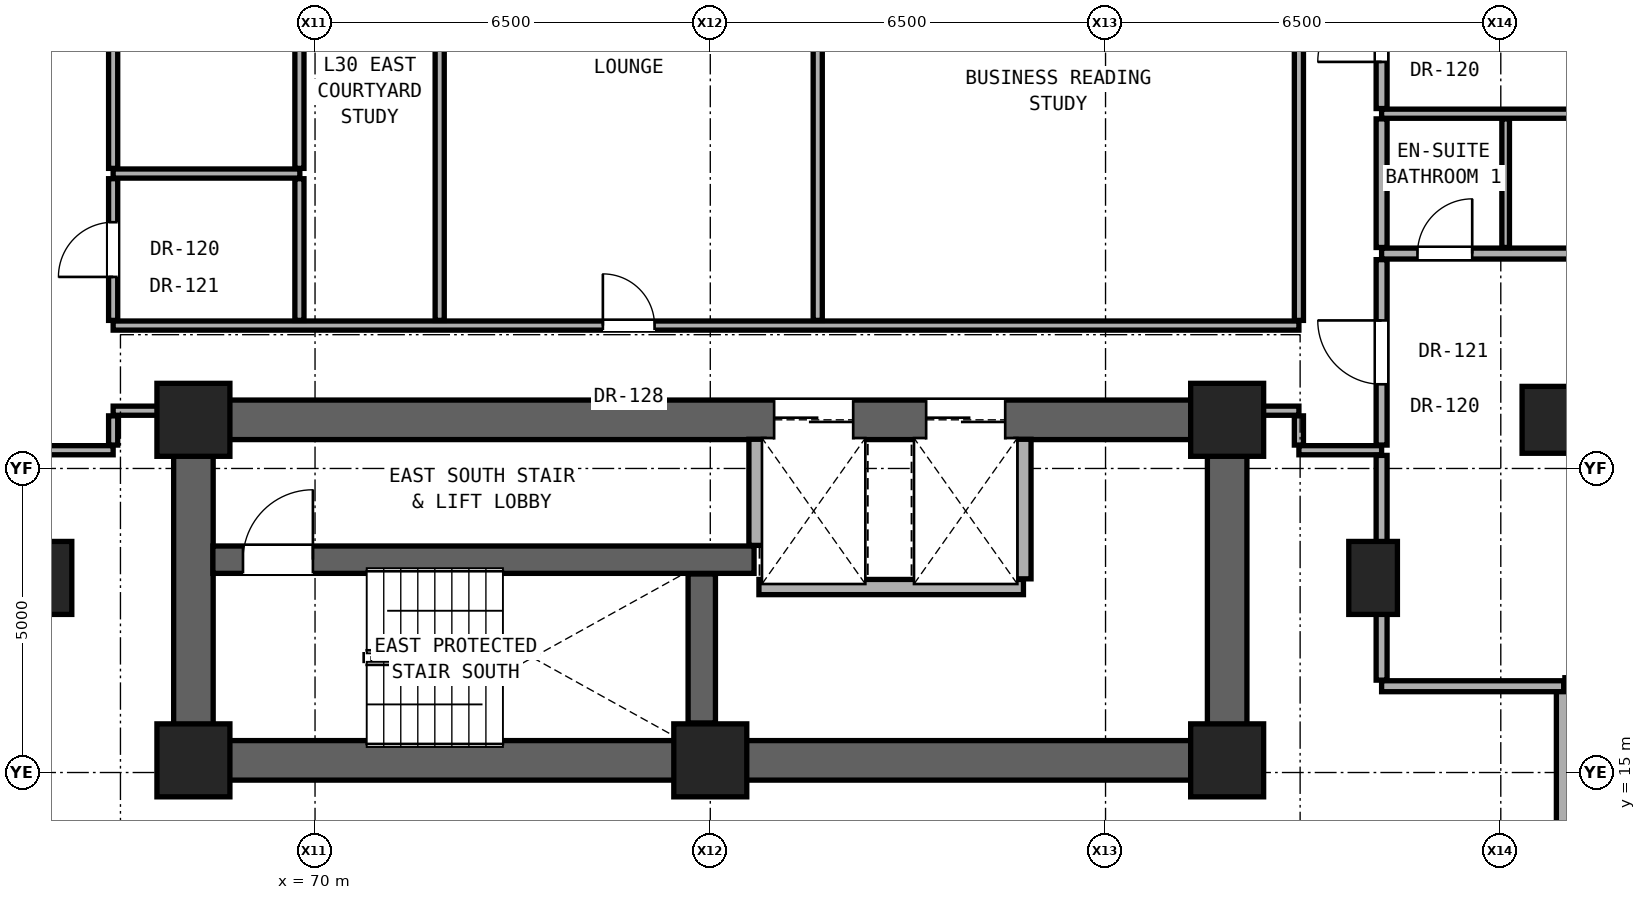
"""IFC4 building model, lengths in metres.
Left out: names, types, materials, properties, quantities, classifications, styles, units other than length and angle.
Written with IfcOpenShell. Run it as: python <this file> out.ifc"""

import sys

from ifc_helpers import new_model, si_unit, direction, frame, frame_2d, origin, origin_2d, place, context, subcontext, project, spatial, rectangle, hollow_rectangle, extrude, element, fill, save


model = new_model("IFC4")
c1 = context("Model", 3, precision=1e-05, world=origin(), true_north=direction((0.0, 1.0)))
c2 = subcontext(c1, "Body", "Model", "MODEL_VIEW")
j1 = project(units=[si_unit("LENGTHUNIT", "METRE"), si_unit("PLANEANGLEUNIT", "RADIAN")], contexts=[c1])
p1 = place(None, origin())
s1 = spatial("IfcSite", under=j1, at=p1, CompositionType="ELEMENT")
p2 = place(p1, origin())
s2 = spatial("IfcBuilding", under=s1, at=p2, CompositionType="ELEMENT")
p3 = place(p2, frame((0.0, 0.0, 108.2)))
s3 = spatial("IfcBuildingStorey", under=s2, at=p3, CompositionType="ELEMENT", Elevation=108.2)
for number, where, z_axis, x_axis in (
    (1, (68.0, 15.2, 0.0), (0.0, 0.0, 1.0), (1.0, 0.0, 0.0)),
    (2, (76.5, 15.2, 0.0), (0.0, 0.0, 1.0), (1.0, 0.0, 0.0)),
    (3, (85.0, 15.2, 0.0), (0.0, 0.0, 1.0), (1.0, 0.0, 0.0)),
    (4, (68.0, 20.8, 0.0), (0.0, 0.0, 1.0), (1.0, 0.0, 0.0)),
    (5, (85.0, 20.8, 0.0), (0.0, 0.0, 1.0), (1.0, 0.0, 0.0)),
):
    element("IfcColumn", number, at=place(p3, frame(where, z_axis=z_axis, x_axis=x_axis)), inside=s3, PredefinedType="COLUMN", context=c2, shape_type="SweptSolid", body=[
        extrude(rectangle(XDim=1.2, YDim=1.2, at=origin_2d()), origin(), (0.0, 0.0, 1.0), 3.3),
    ])
p4 = place(p3, frame((90.4, 20.8, 0.0), z_axis=(0.0, 0.0, 1.0), x_axis=(1.0, 0.0, 0.0)))
e6 = element("IfcColumn", 6, at=p4, inside=s3, PredefinedType="COLUMN", context=c2, shape_type="SweptSolid", body=[
    extrude(hollow_rectangle(XDim=1.1, YDim=1.1, WallThickness=0.06, at=origin_2d()), origin(), (0.0, 0.0, 1.0), 3.3),
])
for number, where, z_axis, x_axis in (
    (7, (65.6, 18.2, 0.0), (0.0, 0.0, 1.0), (1.0, 0.0, 0.0)),
    (8, (87.4, 18.2, 0.0), (0.0, 0.0, 1.0), (1.0, 0.0, 0.0)),
):
    element("IfcColumn", number, at=place(p3, frame(where, z_axis=z_axis, x_axis=x_axis)), inside=s3, PredefinedType="PILASTER", context=c2, shape_type="SweptSolid", body=[
        extrude(rectangle(XDim=0.8, YDim=1.2, at=origin_2d()), origin(), (0.0, 0.0, 1.0), 3.3),
    ])
p5 = place(p3, frame((68.0, 15.2, 0.0), z_axis=(0.0, 0.0, 1.0), x_axis=(1.0, 0.0, 0.0)))
e9 = element("IfcWall", 9, at=p5, inside=s3, PredefinedType="SHEAR", context=c2, shape_type="SweptSolid", body=[
    extrude(rectangle(XDim=17.0, YDim=0.65, at=frame_2d((8.5, 0.0))), origin(), (0.0, 0.0, 1.0), 3.08),
])
for number, where, z_axis, x_axis in (
    (10, (68.0, 15.2, 0.0), (0.0, 0.0, 1.0), (0.0, 1.0, 0.0)),
    (11, (85.0, 15.2, 0.0), (0.0, 0.0, 1.0), (0.0, 1.0, 0.0)),
):
    element("IfcWall", number, at=place(p3, frame(where, z_axis=z_axis, x_axis=x_axis)), inside=s3, PredefinedType="SHEAR", context=c2, shape_type="SweptSolid", body=[
        extrude(rectangle(XDim=5.6, YDim=0.65, at=frame_2d((2.8, 0.0))), origin(), (0.0, 0.0, 1.0), 3.08),
    ])
p6 = place(p3, frame((68.0, 20.8, 0.0), z_axis=(0.0, 0.0, 1.0), x_axis=(1.0, 0.0, 0.0)))
e12 = element("IfcWall", 12, at=p6, inside=s3, PredefinedType="SHEAR", context=c2, shape_type="SweptSolid", body=[
    extrude(rectangle(XDim=17.0, YDim=0.65, at=frame_2d((8.5, 0.0))), origin(), (0.0, 0.0, 1.0), 3.08),
])
p7 = place(p6, frame((9.55, 0.0, 0.0)))
e13 = element("IfcOpeningElement", 13, at=p7, cuts=e12, PredefinedType="OPENING", context=c2, shape_type="SweptSolid", body=[
    extrude(rectangle(XDim=1.3, YDim=2.3, at=frame_2d((0.65, 1.15))), frame((0.0, 0.335, 0.0), z_axis=(0.0, -1.0, 0.0), x_axis=(1.0, 0.0, 0.0)), (0.0, 0.0, 1.0), 0.67),
])
p8 = place(p6, frame((12.05, 0.0, 0.0)))
e14 = element("IfcOpeningElement", 14, at=p8, cuts=e12, PredefinedType="OPENING", context=c2, shape_type="SweptSolid", body=[
    extrude(rectangle(XDim=1.3, YDim=2.3, at=frame_2d((0.65, 1.15))), frame((0.0, 0.335, 0.0), z_axis=(0.0, -1.0, 0.0), x_axis=(1.0, 0.0, 0.0)), (0.0, 0.0, 1.0), 0.67),
])
p9 = place(p3, frame((90.554, 16.419, 0.0), z_axis=(0.0, 0.0, 1.0), x_axis=(1.0, 0.0, 0.0)))
e15 = element("IfcWall", 15, at=p9, inside=s3, PredefinedType="SOLIDWALL", context=c2, shape_type="SweptSolid", body=[
    extrude(rectangle(XDim=4.516, YDim=0.28, at=frame_2d((2.258, 0.0))), origin(), (0.0, 0.0, 1.0), 3.06),
])
p10 = place(p9, frame((0.65, 0.0, 0.85)))
e16 = element("IfcOpeningElement", 16, at=p10, cuts=e15, PredefinedType="OPENING", context=c2, shape_type="SweptSolid", body=[
    extrude(rectangle(XDim=1.1, YDim=2.0, at=frame_2d((0.55, 1.0))), frame((0.0, 0.15, 0.0), z_axis=(0.0, -1.0, 0.0), x_axis=(1.0, 0.0, 0.0)), (0.0, 0.0, 1.0), 0.3),
])
p11 = place(p3, frame((90.554, 11.903, 0.0), z_axis=(0.0, 0.0, 1.0), x_axis=(0.0, 1.0, 0.0)))
e17 = element("IfcWall", 17, at=p11, inside=s3, PredefinedType="SOLIDWALL", context=c2, shape_type="SweptSolid", body=[
    extrude(rectangle(XDim=4.516, YDim=0.28, at=frame_2d((2.258, 0.0))), origin(), (0.0, 0.0, 1.0), 3.06),
])
p12 = place(p3, frame((87.54, 16.419, 0.0), z_axis=(0.0, 0.0, 1.0), x_axis=(1.0, 0.0, 0.0)))
e18 = element("IfcWall", 18, at=p12, inside=s3, PredefinedType="PARTITIONING", context=c2, shape_type="SweptSolid", body=[
    extrude(rectangle(XDim=2.994, YDim=0.18, at=frame_2d((1.497, 0.0))), origin(), (0.0, 0.0, 1.0), 3.08),
])
p13 = place(p3, frame((77.3, 18.05, 0.0), z_axis=(0.0, 0.0, 1.0), x_axis=(1.0, 0.0, 0.0)))
e19 = element("IfcWall", 19, at=p13, inside=s3, PredefinedType="SOLIDWALL", context=c2, shape_type="SweptSolid", body=[
    extrude(rectangle(XDim=4.35, YDim=0.25, at=frame_2d((2.175, 0.0))), origin(), (0.0, 0.0, 1.0), 3.08),
])
p14 = place(p3, frame((68.32, 18.5, 0.0), z_axis=(0.0, 0.0, 1.0), x_axis=(1.0, 0.0, 0.0)))
e20 = element("IfcWall", 20, at=p14, inside=s3, PredefinedType="SHEAR", context=c2, shape_type="SweptSolid", body=[
    extrude(rectangle(XDim=8.9, YDim=0.45, at=frame_2d((4.45, 0.0))), origin(), (0.0, 0.0, 1.0), 3.08),
])
p15 = place(p14, frame((0.495, 0.0, 0.0)))
e21 = element("IfcOpeningElement", 21, at=p15, cuts=e20, PredefinedType="OPENING", context=c2, shape_type="SweptSolid", body=[
    extrude(rectangle(XDim=1.15, YDim=2.2, at=frame_2d((0.575, 1.1))), frame((0.0, 0.235, 0.0), z_axis=(0.0, -1.0, 0.0), x_axis=(1.0, 0.0, 0.0)), (0.0, 0.0, 1.0), 0.47),
])
p16 = place(p3, frame((65.32, 20.3, 0.0), z_axis=(0.0, 0.0, 1.0), x_axis=(1.0, 0.0, 0.0)))
e22 = element("IfcWall", 22, at=p16, inside=s3, PredefinedType="PARTITIONING", context=c2, shape_type="SweptSolid", body=[
    extrude(rectangle(XDim=1.36, YDim=0.15, at=frame_2d((0.68, 0.0))), origin(), (0.0, 0.0, 1.0), 3.08),
])
p17 = place(p3, frame((86.18, 20.3, 0.0), z_axis=(0.0, 0.0, 1.0), x_axis=(1.0, 0.0, 0.0)))
e23 = element("IfcWall", 23, at=p17, inside=s3, PredefinedType="PARTITIONING", context=c2, shape_type="SweptSolid", body=[
    extrude(rectangle(XDim=1.36, YDim=0.15, at=frame_2d((0.68, 0.0))), origin(), (0.0, 0.0, 1.0), 3.08),
])
p18 = place(p3, frame((66.68, 20.95, 0.0), z_axis=(0.0, 0.0, 1.0), x_axis=(1.0, 0.0, 0.0)))
e24 = element("IfcWall", 24, at=p18, inside=s3, PredefinedType="PARTITIONING", context=c2, shape_type="SweptSolid", body=[
    extrude(rectangle(XDim=1.0, YDim=0.15, at=frame_2d((0.5, 0.0))), origin(), (0.0, 0.0, 1.0), 2.472),
])
p19 = place(p3, frame((85.32, 20.95, 0.0), z_axis=(0.0, 0.0, 1.0), x_axis=(1.0, 0.0, 0.0)))
e25 = element("IfcWall", 25, at=p19, inside=s3, PredefinedType="PARTITIONING", context=c2, shape_type="SweptSolid", body=[
    extrude(rectangle(XDim=0.86, YDim=0.15, at=frame_2d((0.43, 0.0))), origin(), (0.0, 0.0, 1.0), 2.472),
])
p20 = place(p3, frame((66.68, 22.35, 0.0), z_axis=(0.0, 0.0, 1.0), x_axis=(1.0, 0.0, 0.0)))
e26 = element("IfcWall", 26, at=p20, inside=s3, PredefinedType="PARTITIONING", context=c2, shape_type="SweptSolid", body=[
    extrude(rectangle(XDim=19.5, YDim=0.15, at=frame_2d((9.75, 0.0))), origin(), (0.0, 0.0, 1.0), 2.145),
])
p21 = place(p20, frame((8.053, 0.0, 0.0)))
e27 = element("IfcOpeningElement", 27, at=p21, cuts=e26, PredefinedType="OPENING", context=c2, shape_type="SweptSolid", body=[
    extrude(rectangle(XDim=0.85, YDim=2.01, at=frame_2d((0.425, 1.005))), frame((0.0, 0.085, 0.0), z_axis=(0.0, -1.0, 0.0), x_axis=(1.0, 0.0, 0.0)), (0.0, 0.0, 1.0), 0.17),
])
p22 = place(p3, frame((87.54, 23.534, 0.0), z_axis=(0.0, 0.0, 1.0), x_axis=(1.0, 0.0, 0.0)))
e28 = element("IfcWall", 28, at=p22, inside=s3, PredefinedType="PARTITIONING", context=c2, shape_type="SweptSolid", body=[
    extrude(rectangle(XDim=7.53, YDim=0.18, at=frame_2d((3.765, 0.0))), origin(), (0.0, 0.0, 1.0), 2.216),
])
p23 = place(p22, frame((4.29, 0.0, 0.0)))
e29 = element("IfcOpeningElement", 29, at=p23, cuts=e28, PredefinedType="OPENING", context=c2, shape_type="SweptSolid", body=[
    extrude(rectangle(XDim=0.95, YDim=2.15, at=frame_2d((0.475, 1.075))), frame((0.0, 0.1, 0.0), z_axis=(0.0, -1.0, 0.0), x_axis=(1.0, 0.0, 0.0)), (0.0, 0.0, 1.0), 0.2),
])
p24 = place(p22, frame((0.59, 0.0, 0.0)))
e30 = element("IfcOpeningElement", 30, at=p24, cuts=e28, PredefinedType="OPENING", context=c2, shape_type="SweptSolid", body=[
    extrude(rectangle(XDim=0.9, YDim=2.1, at=frame_2d((0.45, 1.05))), frame((0.0, 0.1, 0.0), z_axis=(0.0, -1.0, 0.0), x_axis=(1.0, 0.0, 0.0)), (0.0, 0.0, 1.0), 0.2),
])
p25 = place(p3, frame((66.68, 24.85, 0.0), z_axis=(0.0, 0.0, 1.0), x_axis=(1.0, 0.0, 0.0)))
e31 = element("IfcWall", 31, at=p25, inside=s3, PredefinedType="PARTITIONING", context=c2, shape_type="SweptSolid", body=[
    extrude(rectangle(XDim=3.07, YDim=0.15, at=frame_2d((1.535, 0.0))), origin(), (0.0, 0.0, 1.0), 2.145),
])
p26 = place(p3, frame((87.54, 25.834, 0.0), z_axis=(0.0, 0.0, 1.0), x_axis=(1.0, 0.0, 0.0)))
e32 = element("IfcWall", 32, at=p26, inside=s3, PredefinedType="PARTITIONING", context=c2, shape_type="SweptSolid", body=[
    extrude(rectangle(XDim=7.53, YDim=0.15, at=frame_2d((3.765, 0.0))), origin(), (0.0, 0.0, 1.0), 2.216),
])
p27 = place(p3, frame((66.68, 20.385, 0.0), z_axis=(0.0, 0.0, 1.0), x_axis=(0.0, 1.0, 0.0)))
e33 = element("IfcWall", 33, at=p27, inside=s3, PredefinedType="PARTITIONING", context=c2, shape_type="SweptSolid", body=[
    extrude(rectangle(XDim=0.48, YDim=0.15, at=frame_2d((0.24, 0.0))), origin(), (0.0, 0.0, 1.0), 2.472),
])
p28 = place(p3, frame((66.68, 22.435, 0.0), z_axis=(0.0, 0.0, 1.0), x_axis=(0.0, 1.0, 0.0)))
e34 = element("IfcWall", 34, at=p28, inside=s3, PredefinedType="PARTITIONING", context=c2, shape_type="SweptSolid", body=[
    extrude(rectangle(XDim=2.33, YDim=0.15, at=frame_2d((1.165, 0.0))), origin(), (0.0, 0.0, 1.0), 3.08),
])
p29 = place(p28, frame((0.715, 0.0, 0.0)))
e35 = element("IfcOpeningElement", 35, at=p29, cuts=e34, PredefinedType="OPENING", context=c2, shape_type="SweptSolid", body=[
    extrude(rectangle(XDim=0.9, YDim=2.1, at=frame_2d((0.45, 1.05))), frame((0.0, 0.085, 0.0), z_axis=(0.0, -1.0, 0.0), x_axis=(1.0, 0.0, 0.0)), (0.0, 0.0, 1.0), 0.17),
])
p30 = place(p3, frame((66.68, 24.935, 0.0), z_axis=(0.0, 0.0, 1.0), x_axis=(0.0, 1.0, 0.0)))
e36 = element("IfcWall", 36, at=p30, inside=s3, PredefinedType="PARTITIONING", context=c2, shape_type="SweptSolid", body=[
    extrude(rectangle(XDim=5.63, YDim=0.15, at=frame_2d((2.815, 0.0))), origin(), (0.0, 0.0, 1.0), 2.299),
])
p31 = place(p30, frame((2.34, 0.0, 0.0)))
e37 = element("IfcOpeningElement", 37, at=p31, cuts=e36, PredefinedType="OPENING", context=c2, shape_type="SweptSolid", body=[
    extrude(rectangle(XDim=0.95, YDim=2.15, at=frame_2d((0.475, 1.075))), frame((0.0, 0.085, 0.0), z_axis=(0.0, -1.0, 0.0), x_axis=(1.0, 0.0, 0.0)), (0.0, 0.0, 1.0), 0.17),
])
p32 = place(p3, frame((69.743, 22.435, 0.0), z_axis=(0.0, 0.0, 1.0), x_axis=(0.0, 1.0, 0.0)))
e38 = element("IfcWall", 38, at=p32, inside=s3, PredefinedType="PARTITIONING", context=c2, shape_type="SweptSolid", body=[
    extrude(rectangle(XDim=2.33, YDim=0.15, at=frame_2d((1.165, 0.0))), origin(), (0.0, 0.0, 1.0), 3.08),
])
p33 = place(p3, frame((69.743, 24.935, 0.0), z_axis=(0.0, 0.0, 1.0), x_axis=(0.0, 1.0, 0.0)))
e39 = element("IfcWall", 39, at=p33, inside=s3, PredefinedType="PARTITIONING", context=c2, shape_type="SweptSolid", body=[
    extrude(rectangle(XDim=5.63, YDim=0.15, at=frame_2d((2.815, 0.0))), origin(), (0.0, 0.0, 1.0), 2.145),
])
p34 = place(p3, frame((72.05, 22.435, 0.0), z_axis=(0.0, 0.0, 1.0), x_axis=(0.0, 1.0, 0.0)))
e40 = element("IfcWall", 40, at=p34, inside=s3, PredefinedType="PARTITIONING", context=c2, shape_type="SweptSolid", body=[
    extrude(rectangle(XDim=8.13, YDim=0.15, at=frame_2d((4.065, 0.0))), origin(), (0.0, 0.0, 1.0), 2.145),
])
p35 = place(p3, frame((76.36, 15.815, 0.0), z_axis=(0.0, 0.0, 1.0), x_axis=(0.0, 1.0, 0.0)))
e41 = element("IfcWall", 41, at=p35, inside=s3, PredefinedType="SHEAR", context=c2, shape_type="SweptSolid", body=[
    extrude(rectangle(XDim=2.45, YDim=0.45, at=frame_2d((1.225, 0.0))), origin(), (0.0, 0.0, 1.0), 3.08),
])
p36 = place(p3, frame((77.26, 18.735, 0.0), z_axis=(0.0, 0.0, 1.0), x_axis=(0.0, 1.0, 0.0)))
e42 = element("IfcWall", 42, at=p36, inside=s3, PredefinedType="SOLIDWALL", context=c2, shape_type="SweptSolid", body=[
    extrude(rectangle(XDim=1.745, YDim=0.25, at=frame_2d((0.873, 0.0))), origin(), (0.0, 0.0, 1.0), 3.08),
])
p37 = place(p3, frame((78.267, 22.435, 0.0), z_axis=(0.0, 0.0, 1.0), x_axis=(0.0, 1.0, 0.0)))
e43 = element("IfcWall", 43, at=p37, inside=s3, PredefinedType="PARTITIONING", context=c2, shape_type="SweptSolid", body=[
    extrude(rectangle(XDim=8.13, YDim=0.15, at=frame_2d((4.065, 0.0))), origin(), (0.0, 0.0, 1.0), 2.145),
])
p38 = place(p3, frame((81.65, 18.185, 0.0), z_axis=(0.0, 0.0, 1.0), x_axis=(0.0, 1.0, 0.0)))
e44 = element("IfcWall", 44, at=p38, inside=s3, PredefinedType="SOLIDWALL", context=c2, shape_type="SweptSolid", body=[
    extrude(rectangle(XDim=2.295, YDim=0.25, at=frame_2d((1.147, 0.0))), origin(), (0.0, 0.0, 1.0), 3.08),
])
p39 = place(p3, frame((86.18, 20.385, 0.0), z_axis=(0.0, 0.0, 1.0), x_axis=(0.0, 1.0, 0.0)))
e45 = element("IfcWall", 45, at=p39, inside=s3, PredefinedType="PARTITIONING", context=c2, shape_type="SweptSolid", body=[
    extrude(rectangle(XDim=0.48, YDim=0.15, at=frame_2d((0.24, 0.0))), origin(), (0.0, 0.0, 1.0), 2.472),
])
p40 = place(p3, frame((86.18, 22.435, 0.0), z_axis=(0.0, 0.0, 1.0), x_axis=(0.0, 1.0, 0.0)))
e46 = element("IfcWall", 46, at=p40, inside=s3, PredefinedType="PARTITIONING", context=c2, shape_type="SweptSolid", body=[
    extrude(rectangle(XDim=8.13, YDim=0.15, at=frame_2d((4.065, 0.0))), origin(), (0.0, 0.0, 1.0), 2.299),
])
p41 = place(p3, frame((87.54, 16.519, 0.0), z_axis=(0.0, 0.0, 1.0), x_axis=(0.0, 1.0, 0.0)))
e47 = element("IfcWall", 47, at=p41, inside=s3, PredefinedType="PARTITIONING", context=c2, shape_type="SweptSolid", body=[
    extrude(rectangle(XDim=3.696, YDim=0.18, at=frame_2d((1.848, 0.0))), origin(), (0.0, 0.0, 1.0), 2.456),
])
p42 = place(p3, frame((87.54, 20.385, 0.0), z_axis=(0.0, 0.0, 1.0), x_axis=(0.0, 1.0, 0.0)))
e48 = element("IfcWall", 48, at=p42, inside=s3, PredefinedType="PARTITIONING", context=c2, shape_type="SweptSolid", body=[
    extrude(rectangle(XDim=3.049, YDim=0.18, at=frame_2d((1.524, 0.0))), origin(), (0.0, 0.0, 1.0), 2.472),
])
p43 = place(p42, frame((1.0, 0.0, 0.0)))
e49 = element("IfcOpeningElement", 49, at=p43, cuts=e48, PredefinedType="OPENING", context=c2, shape_type="SweptSolid", body=[
    extrude(rectangle(XDim=1.05, YDim=2.2, at=frame_2d((0.525, 1.1))), frame((0.0, 0.1, 0.0), z_axis=(0.0, -1.0, 0.0), x_axis=(1.0, 0.0, 0.0)), (0.0, 0.0, 1.0), 0.2),
])
p44 = place(p3, frame((87.54, 23.634, 0.0), z_axis=(0.0, 0.0, 1.0), x_axis=(0.0, 1.0, 0.0)))
e50 = element("IfcWall", 50, at=p44, inside=s3, PredefinedType="PARTITIONING", context=c2, shape_type="SweptSolid", body=[
    extrude(rectangle(XDim=2.115, YDim=0.18, at=frame_2d((1.058, 0.0))), origin(), (0.0, 0.0, 1.0), 3.08),
])
p45 = place(p3, frame((87.54, 25.919, 0.0), z_axis=(0.0, 0.0, 1.0), x_axis=(0.0, 1.0, 0.0)))
e51 = element("IfcWall", 51, at=p45, inside=s3, PredefinedType="PARTITIONING", context=c2, shape_type="SweptSolid", body=[
    extrude(rectangle(XDim=2.584, YDim=0.18, at=frame_2d((1.292, 0.0))), origin(), (0.0, 0.0, 1.0), 2.299),
])
p46 = place(p45, frame((0.767, 0.0, 0.0)))
e52 = element("IfcOpeningElement", 52, at=p46, cuts=e51, PredefinedType="OPENING", context=c2, shape_type="SweptSolid", body=[
    extrude(rectangle(XDim=1.05, YDim=2.2, at=frame_2d((0.525, 1.1))), frame((0.0, 0.1, 0.0), z_axis=(0.0, -1.0, 0.0), x_axis=(1.0, 0.0, 0.0)), (0.0, 0.0, 1.0), 0.2),
])
p47 = place(p3, frame((89.58, 23.634, 0.0), z_axis=(0.0, 0.0, 1.0), x_axis=(0.0, 1.0, 0.0)))
e53 = element("IfcWall", 53, at=p47, inside=s3, PredefinedType="PARTITIONING", context=c2, shape_type="SweptSolid", body=[
    extrude(rectangle(XDim=2.115, YDim=0.125, at=frame_2d((1.058, 0.0))), origin(), (0.0, 0.0, 1.0), 3.08),
])
p48 = place(p15, origin())
e54 = element("IfcDoor", 54, at=p48, inside=s3, OperationType="SINGLE_SWING_RIGHT", PredefinedType="DOOR", context=c2, shape_type="SweptSolid", body=[
    extrude(rectangle(XDim=1.15, YDim=2.2, at=frame_2d((0.575, 1.1))), frame((0.0, 0.025, 0.0), z_axis=(0.0, -1.0, 0.0), x_axis=(1.0, 0.0, 0.0)), (0.0, 0.0, 1.0), 0.05),
])
fill(e21, e54)
p49 = place(p29, origin())
e55 = element("IfcDoor", 55, at=p49, inside=s3, OperationType="SINGLE_SWING_LEFT", PredefinedType="DOOR", context=c2, shape_type="SweptSolid", body=[
    extrude(rectangle(XDim=0.9, YDim=2.1, at=frame_2d((0.45, 1.05))), frame((0.0, 0.025, 0.0), z_axis=(0.0, -1.0, 0.0), x_axis=(1.0, 0.0, 0.0)), (0.0, 0.0, 1.0), 0.05),
])
fill(e35, e55)
p50 = place(p43, origin())
e56 = element("IfcDoor", 56, at=p50, inside=s3, OperationType="SINGLE_SWING_RIGHT", PredefinedType="DOOR", context=c2, shape_type="SweptSolid", body=[
    extrude(rectangle(XDim=1.05, YDim=2.2, at=frame_2d((0.525, 1.1))), frame((0.0, 0.025, 0.0), z_axis=(0.0, -1.0, 0.0), x_axis=(1.0, 0.0, 0.0)), (0.0, 0.0, 1.0), 0.05),
])
fill(e49, e56)
p51 = place(p24, origin())
e57 = element("IfcDoor", 57, at=p51, inside=s3, OperationType="SINGLE_SWING_RIGHT", PredefinedType="DOOR", context=c2, shape_type="SweptSolid", body=[
    extrude(rectangle(XDim=0.9, YDim=2.1, at=frame_2d((0.45, 1.05))), frame((0.0, 0.025, 0.0), z_axis=(0.0, -1.0, 0.0), x_axis=(1.0, 0.0, 0.0)), (0.0, 0.0, 1.0), 0.05),
])
fill(e30, e57)
p52 = place(p46, origin())
e58 = element("IfcDoor", 58, at=p52, inside=s3, OperationType="SINGLE_SWING_LEFT", PredefinedType="DOOR", context=c2, shape_type="SweptSolid", body=[
    extrude(rectangle(XDim=1.05, YDim=2.2, at=frame_2d((0.525, 1.1))), frame((0.0, 0.025, 0.0), z_axis=(0.0, -1.0, 0.0), x_axis=(1.0, 0.0, 0.0)), (0.0, 0.0, 1.0), 0.05),
])
fill(e52, e58)
p53 = place(p21, origin())
e59 = element("IfcDoor", 59, at=p53, inside=s3, OperationType="SINGLE_SWING_LEFT", PredefinedType="DOOR", context=c2, shape_type="SweptSolid", body=[
    extrude(rectangle(XDim=0.85, YDim=2.01, at=frame_2d((0.425, 1.005))), frame((0.0, 0.025, 0.0), z_axis=(0.0, -1.0, 0.0), x_axis=(1.0, 0.0, 0.0)), (0.0, 0.0, 1.0), 0.05),
])
fill(e27, e59)
p54 = place(p7, origin())
e60 = element("IfcDoor", 60, at=p54, inside=s3, OperationType="DOUBLE_DOOR_SLIDING", PredefinedType="DOOR", context=c2, shape_type="SweptSolid", body=[
    extrude(rectangle(XDim=1.3, YDim=2.3, at=frame_2d((0.65, 1.15))), frame((0.0, 0.025, 0.0), z_axis=(0.0, -1.0, 0.0), x_axis=(1.0, 0.0, 0.0)), (0.0, 0.0, 1.0), 0.05),
])
fill(e13, e60)
p55 = place(p8, origin())
e61 = element("IfcDoor", 61, at=p55, inside=s3, OperationType="DOUBLE_DOOR_SLIDING", PredefinedType="DOOR", context=c2, shape_type="SweptSolid", body=[
    extrude(rectangle(XDim=1.3, YDim=2.3, at=frame_2d((0.65, 1.15))), frame((0.0, 0.025, 0.0), z_axis=(0.0, -1.0, 0.0), x_axis=(1.0, 0.0, 0.0)), (0.0, 0.0, 1.0), 0.05),
])
fill(e14, e61)
save(model, sys.argv[1])
